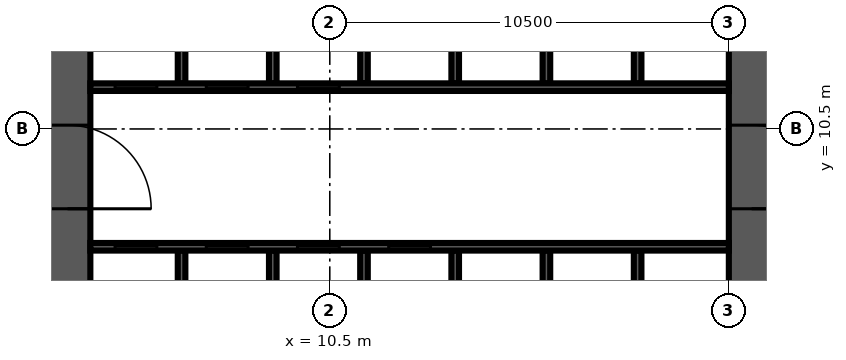
"""IFC4 building model, lengths in metres.
Left out: names, types, materials, properties, quantities, classifications, styles, units other than length and angle.
Written with IfcOpenShell. Run it as: python <this file> out.ifc"""

import sys

from ifc_helpers import new_model, si_unit, direction, frame, frame_2d, origin, place, context, subcontext, project, spatial, rectangle, extrude, source, transform, mapped, element, fill, save


model = new_model("IFC4")
c1 = context("Model", 3, precision=1e-05, world=origin(), true_north=direction((0.0, 1.0)))
c2 = subcontext(c1, "Body", "Model", "MODEL_VIEW")
j1 = project(units=[si_unit("LENGTHUNIT", "METRE"), si_unit("PLANEANGLEUNIT", "RADIAN")], contexts=[c1])
p1 = place(None, origin())
s1 = spatial("IfcSite", under=j1, at=p1, CompositionType="ELEMENT")
p2 = place(p1, origin())
s2 = spatial("IfcBuilding", under=s1, at=p2, CompositionType="ELEMENT")
p3 = place(p2, frame((0.0, 0.0, 69.9)))
s3 = spatial("IfcBuildingStorey", under=s2, at=p3, CompositionType="ELEMENT", Elevation=69.9)
m1 = source(origin(), c2, "Body", "SweptSolid", [
    extrude(rectangle(XDim=18.0, YDim=1.2, at=frame_2d((9.0, 0.0))), origin(), (0.0, 0.0, 1.0), 4.2),
])
p4 = place(p3, frame((3.6, 4.2, 0.0), z_axis=(0.0, 0.0, 1.0), x_axis=(0.0, 1.0, 0.0)))
e1 = element("IfcWall", 1, at=p4, inside=s3, PredefinedType="SHEAR", context=c2, shape_type="MappedRepresentation", body=[
    mapped(m1, transform((0.0, 0.0, 0.0), scale=1.0)),
])
m2 = source(origin(), c2, "Body", "SweptSolid", [
    extrude(rectangle(XDim=2.2, YDim=2.1, at=frame_2d((1.1, 1.05))), frame((0.0, 0.61, 0.0), z_axis=(0.0, -1.0, 0.0), x_axis=(1.0, 0.0, 0.0)), (0.0, 0.0, 1.0), 1.22),
])
p5 = place(p4, frame((4.2, 0.0, 0.0)))
e2 = element("IfcOpeningElement", 2, at=p5, cuts=e1, PredefinedType="OPENING", context=c2, shape_type="MappedRepresentation", body=[
    mapped(m2, transform((0.0, 0.0, 0.0), scale=1.0)),
])
m3 = source(origin(), c2, "Body", "SweptSolid", [
    extrude(rectangle(XDim=16.8, YDim=1.2, at=frame_2d((8.4, 0.0))), origin(), (0.0, 0.0, 1.0), 4.2),
])
p6 = place(p3, frame((21.6, 4.2, 0.0), z_axis=(0.0, 0.0, 1.0), x_axis=(0.0, 1.0, 0.0)))
e3 = element("IfcWall", 3, at=p6, inside=s3, PredefinedType="SHEAR", context=c2, shape_type="MappedRepresentation", body=[
    mapped(m3, transform((0.0, 0.0, 0.0), scale=1.0)),
])
p7 = place(p6, frame((4.2, 0.0, 0.0)))
e4 = element("IfcOpeningElement", 4, at=p7, cuts=e3, PredefinedType="OPENING", context=c2, shape_type="MappedRepresentation", body=[
    mapped(m2, transform((0.0, 0.0, 0.0), scale=1.0)),
])
m4 = source(origin(), c2, "Body", "SweptSolid", [
    extrude(rectangle(XDim=1.2, YDim=2.1, at=frame_2d((0.6, 1.05))), frame((0.0, 0.61, 0.0), z_axis=(0.0, -1.0, 0.0), x_axis=(1.0, 0.0, 0.0)), (0.0, 0.0, 1.0), 1.22),
])
p8 = place(p6, frame((14.7, 0.0, 0.0)))
e5 = element("IfcOpeningElement", 5, at=p8, cuts=e3, PredefinedType="OPENING", context=c2, shape_type="MappedRepresentation", body=[
    mapped(m4, transform((0.0, 0.0, 0.0), scale=1.0)),
])
m5 = source(origin(), c2, "Body", "SweptSolid", [
    extrude(rectangle(XDim=3.1, YDim=0.2, at=frame_2d((1.55, 0.0))), origin(), (0.0, 0.0, 1.0), 4.2),
])
for number, where, z_axis, x_axis in (
    (6, (6.6, 4.2, 0.0), (0.0, 0.0, 1.0), (0.0, 1.0, 0.0)),
    (7, (9.0, 4.2, 0.0), (0.0, 0.0, 1.0), (0.0, 1.0, 0.0)),
    (8, (11.4, 4.2, 0.0), (0.0, 0.0, 1.0), (0.0, 1.0, 0.0)),
    (9, (13.8, 4.2, 0.0), (0.0, 0.0, 1.0), (0.0, 1.0, 0.0)),
    (10, (16.2, 4.2, 0.0), (0.0, 0.0, 1.0), (0.0, 1.0, 0.0)),
    (11, (18.6, 4.2, 0.0), (0.0, 0.0, 1.0), (0.0, 1.0, 0.0)),
):
    element("IfcWall", number, at=place(p3, frame(where, z_axis=z_axis, x_axis=x_axis)), inside=s3, PredefinedType="SOLIDWALL", context=c2, shape_type="MappedRepresentation", body=[
        mapped(m5, transform((0.0, 0.0, 0.0), scale=1.0)),
    ])
m6 = source(origin(), c2, "Body", "SweptSolid", [
    extrude(rectangle(XDim=3.0, YDim=0.2, at=frame_2d((1.5, 0.0))), origin(), (0.0, 0.0, 1.0), 4.2),
])
for number, where, z_axis, x_axis in (
    (12, (6.6, 11.7, 0.0), (0.0, 0.0, 1.0), (0.0, 1.0, 0.0)),
    (13, (9.0, 11.7, 0.0), (0.0, 0.0, 1.0), (0.0, 1.0, 0.0)),
    (14, (11.4, 11.7, 0.0), (0.0, 0.0, 1.0), (0.0, 1.0, 0.0)),
    (15, (13.8, 11.7, 0.0), (0.0, 0.0, 1.0), (0.0, 1.0, 0.0)),
    (16, (16.2, 11.7, 0.0), (0.0, 0.0, 1.0), (0.0, 1.0, 0.0)),
    (17, (18.6, 11.7, 0.0), (0.0, 0.0, 1.0), (0.0, 1.0, 0.0)),
):
    element("IfcWall", number, at=place(p3, frame(where, z_axis=z_axis, x_axis=x_axis)), inside=s3, PredefinedType="SOLIDWALL", context=c2, shape_type="MappedRepresentation", body=[
        mapped(m6, transform((0.0, 0.0, 0.0), scale=1.0)),
    ])
m7 = source(origin(), c2, "Body", "SweptSolid", [
    extrude(rectangle(XDim=16.8, YDim=0.2, at=frame_2d((8.4, 0.0))), origin(), (0.0, 0.0, 1.0), 4.2),
])
p9 = place(p3, frame((4.2, 7.4, 0.0), z_axis=(0.0, 0.0, 1.0), x_axis=(1.0, 0.0, 0.0)))
e18 = element("IfcWall", 18, at=p9, inside=s3, PredefinedType="SOLIDWALL", context=c2, shape_type="MappedRepresentation", body=[
    mapped(m7, transform((0.0, 0.0, 0.0), scale=1.0)),
])
m8 = source(origin(), c2, "Body", "SweptSolid", [
    extrude(rectangle(XDim=1.1, YDim=2.1, at=frame_2d((0.55, 1.05))), frame((0.0, 0.11, 0.0), z_axis=(0.0, -1.0, 0.0), x_axis=(1.0, 0.0, 0.0)), (0.0, 0.0, 1.0), 0.22),
])
p10 = place(p9, frame((0.65, 0.0, 0.0)))
e19 = element("IfcOpeningElement", 19, at=p10, cuts=e18, PredefinedType="OPENING", context=c2, shape_type="MappedRepresentation", body=[
    mapped(m8, transform((0.0, 0.0, 0.0), scale=1.0)),
])
p11 = place(p9, frame((3.05, 0.0, 0.0)))
e20 = element("IfcOpeningElement", 20, at=p11, cuts=e18, PredefinedType="OPENING", context=c2, shape_type="MappedRepresentation", body=[
    mapped(m8, transform((0.0, 0.0, 0.0), scale=1.0)),
])
p12 = place(p9, frame((5.45, 0.0, 0.0)))
e21 = element("IfcOpeningElement", 21, at=p12, cuts=e18, PredefinedType="OPENING", context=c2, shape_type="MappedRepresentation", body=[
    mapped(m8, transform((0.0, 0.0, 0.0), scale=1.0)),
])
p13 = place(p9, frame((7.85, 0.0, 0.0)))
e22 = element("IfcOpeningElement", 22, at=p13, cuts=e18, PredefinedType="OPENING", context=c2, shape_type="MappedRepresentation", body=[
    mapped(m8, transform((0.0, 0.0, 0.0), scale=1.0)),
])
p14 = place(p3, frame((4.2, 11.6, 0.0), z_axis=(0.0, 0.0, 1.0), x_axis=(1.0, 0.0, 0.0)))
e23 = element("IfcWall", 23, at=p14, inside=s3, PredefinedType="SOLIDWALL", context=c2, shape_type="MappedRepresentation", body=[
    mapped(m7, transform((0.0, 0.0, 0.0), scale=1.0)),
])
p15 = place(p14, frame((0.65, 0.0, 0.0)))
e24 = element("IfcOpeningElement", 24, at=p15, cuts=e23, PredefinedType="OPENING", context=c2, shape_type="MappedRepresentation", body=[
    mapped(m8, transform((0.0, 0.0, 0.0), scale=1.0)),
])
p16 = place(p14, frame((3.05, 0.0, 0.0)))
e25 = element("IfcOpeningElement", 25, at=p16, cuts=e23, PredefinedType="OPENING", context=c2, shape_type="MappedRepresentation", body=[
    mapped(m8, transform((0.0, 0.0, 0.0), scale=1.0)),
])
p17 = place(p14, frame((5.45, 0.0, 0.0)))
e26 = element("IfcOpeningElement", 26, at=p17, cuts=e23, PredefinedType="OPENING", context=c2, shape_type="MappedRepresentation", body=[
    mapped(m8, transform((0.0, 0.0, 0.0), scale=1.0)),
])
m9 = source(origin(), c2, "Body", "SweptSolid", [
    extrude(rectangle(XDim=1.1, YDim=2.1, at=frame_2d((0.55, 1.05))), frame((0.0, 0.025, 0.0), z_axis=(0.0, -1.0, 0.0), x_axis=(1.0, 0.0, 0.0)), (0.0, 0.0, 1.0), 0.05),
])
p18 = place(p10, origin())
e27 = element("IfcDoor", 27, at=p18, inside=s3, OperationType="SLIDING_TO_LEFT", PredefinedType="DOOR", context=c2, shape_type="MappedRepresentation", body=[
    mapped(m9, transform((0.0, 0.0, 0.0), scale=1.0)),
])
fill(e19, e27)
p19 = place(p11, origin())
e28 = element("IfcDoor", 28, at=p19, inside=s3, OperationType="SLIDING_TO_LEFT", PredefinedType="DOOR", context=c2, shape_type="MappedRepresentation", body=[
    mapped(m9, transform((0.0, 0.0, 0.0), scale=1.0)),
])
fill(e20, e28)
p20 = place(p12, origin())
e29 = element("IfcDoor", 29, at=p20, inside=s3, OperationType="SLIDING_TO_LEFT", PredefinedType="DOOR", context=c2, shape_type="MappedRepresentation", body=[
    mapped(m9, transform((0.0, 0.0, 0.0), scale=1.0)),
])
fill(e21, e29)
p21 = place(p13, origin())
e30 = element("IfcDoor", 30, at=p21, inside=s3, OperationType="SLIDING_TO_LEFT", PredefinedType="DOOR", context=c2, shape_type="MappedRepresentation", body=[
    mapped(m9, transform((0.0, 0.0, 0.0), scale=1.0)),
])
fill(e22, e30)
p22 = place(p15, origin())
e31 = element("IfcDoor", 31, at=p22, inside=s3, OperationType="SLIDING_TO_LEFT", PredefinedType="DOOR", context=c2, shape_type="MappedRepresentation", body=[
    mapped(m9, transform((0.0, 0.0, 0.0), scale=1.0)),
])
fill(e24, e31)
p23 = place(p16, origin())
e32 = element("IfcDoor", 32, at=p23, inside=s3, OperationType="SLIDING_TO_LEFT", PredefinedType="DOOR", context=c2, shape_type="MappedRepresentation", body=[
    mapped(m9, transform((0.0, 0.0, 0.0), scale=1.0)),
])
fill(e25, e32)
p24 = place(p17, origin())
e33 = element("IfcDoor", 33, at=p24, inside=s3, OperationType="SLIDING_TO_LEFT", PredefinedType="DOOR", context=c2, shape_type="MappedRepresentation", body=[
    mapped(m9, transform((0.0, 0.0, 0.0), scale=1.0)),
])
fill(e26, e33)
m10 = source(origin(), c2, "Body", "SweptSolid", [
    extrude(rectangle(XDim=2.2, YDim=2.1, at=frame_2d((1.1, 1.05))), frame((0.0, 0.025, 0.0), z_axis=(0.0, -1.0, 0.0), x_axis=(1.0, 0.0, 0.0)), (0.0, 0.0, 1.0), 0.05),
])
p25 = place(p7, origin())
e34 = element("IfcDoor", 34, at=p25, inside=s3, OperationType="DOUBLE_DOOR_SINGLE_SWING", PredefinedType="DOOR", context=c2, shape_type="MappedRepresentation", body=[
    mapped(m10, transform((0.0, 0.0, 0.0), scale=1.0)),
])
fill(e4, e34)
p26 = place(p5, origin())
e35 = element("IfcDoor", 35, at=p26, inside=s3, OperationType="DOUBLE_DOOR_SINGLE_SWING", PredefinedType="DOOR", context=c2, shape_type="MappedRepresentation", body=[
    mapped(m10, transform((0.0, 0.0, 0.0), scale=1.0)),
])
fill(e2, e35)
save(model, sys.argv[1])
